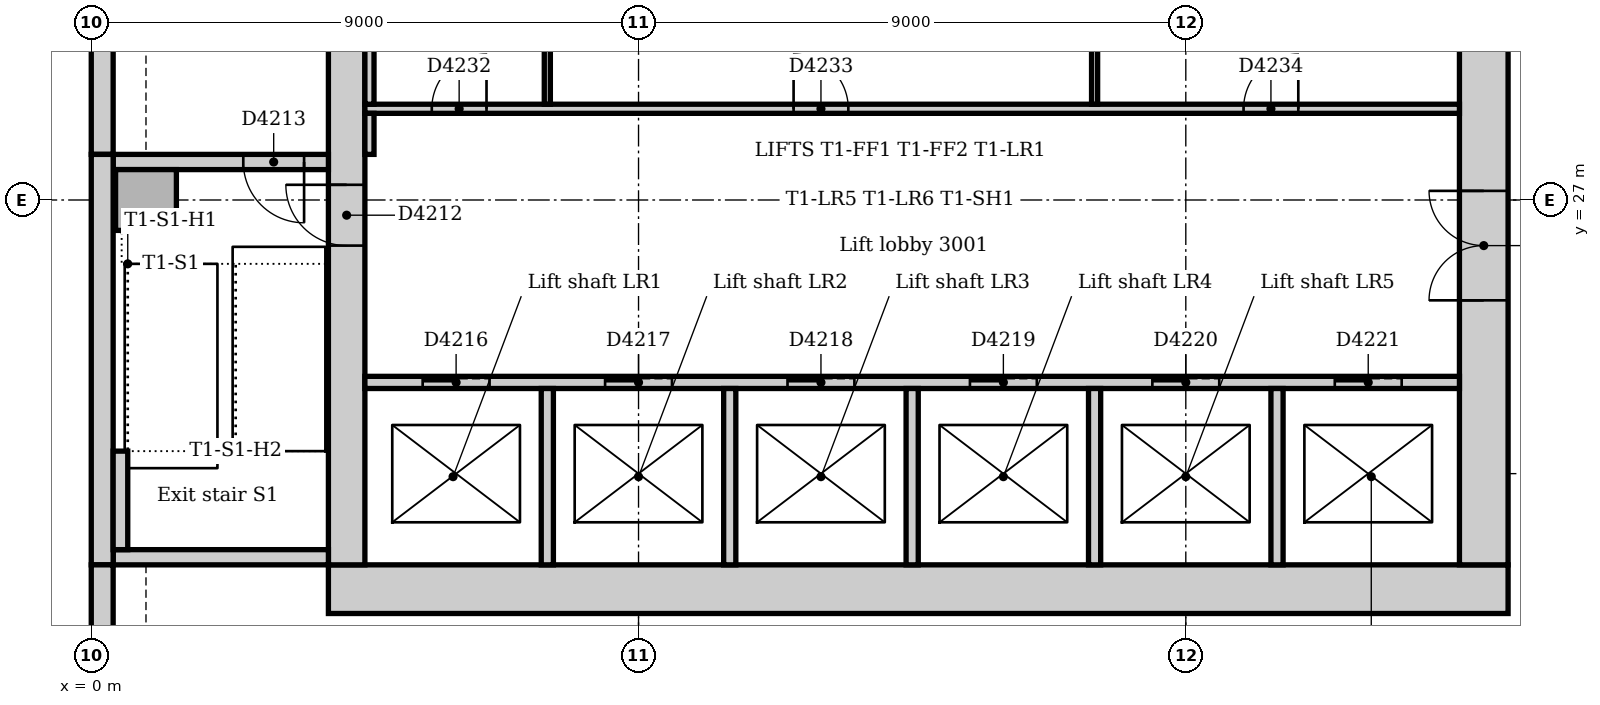
"""IFC4 building model, lengths in metres.
Left out: names, types, materials, properties, quantities, classifications, styles, units other than length and angle.
Written with IfcOpenShell. Run it as: python <this file> out.ifc"""

import sys

from ifc_helpers import new_model, si_unit, direction, frame, frame_2d, origin, origin_2d, place, context, subcontext, project, spatial, rectangle, extrude, element, fill, save


model = new_model("IFC4")
c1 = context("Model", 3, precision=1e-05, world=origin(), true_north=direction((0.0, 1.0)))
c2 = subcontext(c1, "Body", "Model", "MODEL_VIEW")
j1 = project(units=[si_unit("LENGTHUNIT", "METRE"), si_unit("PLANEANGLEUNIT", "RADIAN")], contexts=[c1])
p1 = place(None, origin())
s1 = spatial("IfcSite", under=j1, at=p1, CompositionType="ELEMENT")
p2 = place(p1, origin())
s2 = spatial("IfcBuilding", under=s1, at=p2, CompositionType="ELEMENT")
p3 = place(p2, frame((0.0, 0.0, 128.0)))
s3 = spatial("IfcBuildingStorey", under=s2, at=p3, CompositionType="ELEMENT", Elevation=128.0)
p4 = place(p3, frame((3.9, 20.6, 0.0), z_axis=(0.0, 0.0, 1.0), x_axis=(1.0, 0.0, 0.0)))
e1 = element("IfcWall", 1, at=p4, inside=s3, PredefinedType="SOLIDWALL", context=c2, shape_type="SweptSolid", body=[
    extrude(rectangle(XDim=19.4, YDim=0.8, at=frame_2d((9.7, 0.0))), origin(), (0.0, 0.0, 1.0), 4.0),
])
p5 = place(p3, frame((22.9, 21.0, 0.0), z_axis=(0.0, 0.0, 1.0), x_axis=(0.0, 1.0, 0.0)))
e2 = element("IfcWall", 2, at=p5, inside=s3, PredefinedType="SOLIDWALL", context=c2, shape_type="SweptSolid", body=[
    extrude(rectangle(XDim=10.5, YDim=0.8, at=frame_2d((5.25, 0.0))), origin(), (0.0, 0.0, 1.0), 4.0),
])
p6 = place(p5, frame((4.35, 0.0, 0.0)))
e3 = element("IfcOpeningElement", 3, at=p6, cuts=e2, PredefinedType="OPENING", context=c2, shape_type="SweptSolid", body=[
    extrude(rectangle(XDim=1.8, YDim=2.1, at=frame_2d((0.9, 1.05))), frame((0.0, 0.41, 0.0), z_axis=(0.0, -1.0, 0.0), x_axis=(1.0, 0.0, 0.0)), (0.0, 0.0, 1.0), 0.82),
])
p7 = place(p3, frame((4.2, 31.5, 0.0), z_axis=(0.0, 0.0, 1.0), x_axis=(0.0, -1.0, 0.0)))
e4 = element("IfcWall", 4, at=p7, inside=s3, PredefinedType="SOLIDWALL", context=c2, shape_type="SweptSolid", body=[
    extrude(rectangle(XDim=10.5, YDim=0.6, at=frame_2d((5.25, 0.0))), origin(), (0.0, 0.0, 1.0), 4.0),
])
p8 = place(p7, frame((4.25, 0.0, 0.0)))
e5 = element("IfcOpeningElement", 5, at=p8, cuts=e4, PredefinedType="OPENING", context=c2, shape_type="SweptSolid", body=[
    extrude(rectangle(XDim=1.0, YDim=2.1, at=frame_2d((0.5, 1.05))), frame((0.0, 0.31, 0.0), z_axis=(0.0, -1.0, 0.0), x_axis=(1.0, 0.0, 0.0)), (0.0, 0.0, 1.0), 0.62),
])
p9 = place(p3, frame((0.36, 21.125, 0.0), z_axis=(0.0, 0.0, 1.0), x_axis=(1.0, 0.0, 0.0)))
e6 = element("IfcWall", 6, at=p9, inside=s3, PredefinedType="SOLIDWALL", context=c2, shape_type="SweptSolid", body=[
    extrude(rectangle(XDim=3.54, YDim=0.25, at=frame_2d((1.77, 0.0))), origin(), (0.0, 0.0, 1.0), 4.0),
])
p10 = place(p3, frame((3.9, 27.625, 0.0), z_axis=(0.0, 0.0, 1.0), x_axis=(-1.0, 0.0, 0.0)))
e7 = element("IfcWall", 7, at=p10, inside=s3, PredefinedType="SOLIDWALL", context=c2, shape_type="SweptSolid", body=[
    extrude(rectangle(XDim=3.54, YDim=0.25, at=frame_2d((1.77, 0.0))), origin(), (0.0, 0.0, 1.0), 4.0),
])
p11 = place(p10, frame((0.4, 0.0, 0.0)))
e8 = element("IfcOpeningElement", 8, at=p11, cuts=e7, PredefinedType="OPENING", context=c2, shape_type="SweptSolid", body=[
    extrude(rectangle(XDim=1.0, YDim=2.1, at=frame_2d((0.5, 1.05))), frame((0.0, 0.135, 0.0), z_axis=(0.0, -1.0, 0.0), x_axis=(1.0, 0.0, 0.0)), (0.0, 0.0, 1.0), 0.27),
])
p12 = place(p3, frame((0.9, 27.0, 0.0), z_axis=(0.0, 0.0, 1.0), x_axis=(1.0, 0.0, 0.0)))
e9 = element("IfcColumn", 9, at=p12, inside=s3, PredefinedType="COLUMN", context=c2, shape_type="SweptSolid", body=[
    extrude(rectangle(XDim=1.0, YDim=1.0, at=origin_2d()), origin(), (0.0, 0.0, 1.0), 4.0),
])
p13 = place(p3, frame((0.18, 35.25, 0.0), z_axis=(0.0, 0.0, 1.0), x_axis=(0.0, -1.0, 0.0)))
e10 = element("IfcWall", 10, at=p13, inside=s3, PredefinedType="STANDARD", context=c2, shape_type="SweptSolid", body=[
    extrude(rectangle(XDim=7.5, YDim=0.36, at=frame_2d((3.75, 0.0))), origin(), (0.0, 0.0, 1.0), 3.85),
])
p14 = place(p3, frame((0.18, 27.75, 0.0), z_axis=(0.0, 0.0, 1.0), x_axis=(0.0, -1.0, 0.0)))
e11 = element("IfcWall", 11, at=p14, inside=s3, PredefinedType="STANDARD", context=c2, shape_type="SweptSolid", body=[
    extrude(rectangle(XDim=6.75, YDim=0.36, at=frame_2d((3.375, 0.0))), origin(), (0.0, 0.0, 1.0), 3.85),
])
p15 = place(p3, frame((0.18, 21.0, 0.0), z_axis=(0.0, 0.0, 1.0), x_axis=(0.0, -1.0, 0.0)))
e12 = element("IfcWall", 12, at=p15, inside=s3, PredefinedType="STANDARD", context=c2, shape_type="SweptSolid", body=[
    extrude(rectangle(XDim=12.257, YDim=0.36, at=frame_2d((6.129, 0.0))), origin(), (0.0, 0.0, 1.0), 3.85),
])
p16 = place(p15, frame((1.35, 0.0, 0.9)))
e13 = element("IfcOpeningElement", 13, at=p16, cuts=e12, PredefinedType="OPENING", context=c2, shape_type="SweptSolid", body=[
    extrude(rectangle(XDim=3.3, YDim=1.6, at=frame_2d((1.65, 0.8))), frame((0.0, 0.19, 0.0), z_axis=(0.0, -1.0, 0.0), x_axis=(1.0, 0.0, 0.0)), (0.0, 0.0, 1.0), 0.38),
])
p17 = place(p15, frame((5.85, 0.0, 0.9)))
e14 = element("IfcOpeningElement", 14, at=p17, cuts=e12, PredefinedType="OPENING", context=c2, shape_type="SweptSolid", body=[
    extrude(rectangle(XDim=3.3, YDim=1.6, at=frame_2d((1.65, 0.8))), frame((0.0, 0.19, 0.0), z_axis=(0.0, -1.0, 0.0), x_axis=(1.0, 0.0, 0.0)), (0.0, 0.0, 1.0), 0.38),
])
p18 = place(p3, frame((0.48, 21.25, 0.0), z_axis=(0.0, 0.0, 1.0), x_axis=(0.0, 1.0, 0.0)))
e15 = element("IfcWall", 15, at=p18, inside=s3, PredefinedType="STANDARD", context=c2, shape_type="SweptSolid", body=[
    extrude(rectangle(XDim=1.62, YDim=0.24, at=frame_2d((0.81, 0.0))), origin(), (0.0, 0.0, 1.0), 4.0),
])
p19 = place(p3, frame((4.5, 24.0, 0.0), z_axis=(0.0, 0.0, 1.0), x_axis=(1.0, 0.0, 0.0)))
e16 = element("IfcWall", 16, at=p19, inside=s3, PredefinedType="PARTITIONING", context=c2, shape_type="SweptSolid", body=[
    extrude(rectangle(XDim=18.0, YDim=0.2, at=frame_2d((9.0, 0.0))), origin(), (0.0, 0.0, 1.0), 3.85),
])
p20 = place(p19, frame((0.95, 0.0, 0.0)))
e17 = element("IfcOpeningElement", 17, at=p20, cuts=e16, PredefinedType="OPENING", context=c2, shape_type="SweptSolid", body=[
    extrude(rectangle(XDim=1.1, YDim=2.1, at=frame_2d((0.55, 1.05))), frame((0.0, 0.11, 0.0), z_axis=(0.0, -1.0, 0.0), x_axis=(1.0, 0.0, 0.0)), (0.0, 0.0, 1.0), 0.22),
])
p21 = place(p19, frame((3.95, 0.0, 0.0)))
e18 = element("IfcOpeningElement", 18, at=p21, cuts=e16, PredefinedType="OPENING", context=c2, shape_type="SweptSolid", body=[
    extrude(rectangle(XDim=1.1, YDim=2.1, at=frame_2d((0.55, 1.05))), frame((0.0, 0.11, 0.0), z_axis=(0.0, -1.0, 0.0), x_axis=(1.0, 0.0, 0.0)), (0.0, 0.0, 1.0), 0.22),
])
p22 = place(p19, frame((6.95, 0.0, 0.0)))
e19 = element("IfcOpeningElement", 19, at=p22, cuts=e16, PredefinedType="OPENING", context=c2, shape_type="SweptSolid", body=[
    extrude(rectangle(XDim=1.1, YDim=2.1, at=frame_2d((0.55, 1.05))), frame((0.0, 0.11, 0.0), z_axis=(0.0, -1.0, 0.0), x_axis=(1.0, 0.0, 0.0)), (0.0, 0.0, 1.0), 0.22),
])
p23 = place(p19, frame((9.95, 0.0, 0.0)))
e20 = element("IfcOpeningElement", 20, at=p23, cuts=e16, PredefinedType="OPENING", context=c2, shape_type="SweptSolid", body=[
    extrude(rectangle(XDim=1.1, YDim=2.1, at=frame_2d((0.55, 1.05))), frame((0.0, 0.11, 0.0), z_axis=(0.0, -1.0, 0.0), x_axis=(1.0, 0.0, 0.0)), (0.0, 0.0, 1.0), 0.22),
])
p24 = place(p19, frame((12.95, 0.0, 0.0)))
e21 = element("IfcOpeningElement", 21, at=p24, cuts=e16, PredefinedType="OPENING", context=c2, shape_type="SweptSolid", body=[
    extrude(rectangle(XDim=1.1, YDim=2.1, at=frame_2d((0.55, 1.05))), frame((0.0, 0.11, 0.0), z_axis=(0.0, -1.0, 0.0), x_axis=(1.0, 0.0, 0.0)), (0.0, 0.0, 1.0), 0.22),
])
p25 = place(p19, frame((15.95, 0.0, 0.0)))
e22 = element("IfcOpeningElement", 22, at=p25, cuts=e16, PredefinedType="OPENING", context=c2, shape_type="SweptSolid", body=[
    extrude(rectangle(XDim=1.1, YDim=2.1, at=frame_2d((0.55, 1.05))), frame((0.0, 0.11, 0.0), z_axis=(0.0, -1.0, 0.0), x_axis=(1.0, 0.0, 0.0)), (0.0, 0.0, 1.0), 0.22),
])
for number, where, z_axis, x_axis in (
    (23, (7.5, 21.0, 0.0), (0.0, 0.0, 1.0), (0.0, 1.0, 0.0)),
    (24, (10.5, 21.0, 0.0), (0.0, 0.0, 1.0), (0.0, 1.0, 0.0)),
    (25, (13.5, 21.0, 0.0), (0.0, 0.0, 1.0), (0.0, 1.0, 0.0)),
    (26, (16.5, 21.0, 0.0), (0.0, 0.0, 1.0), (0.0, 1.0, 0.0)),
    (27, (19.5, 21.0, 0.0), (0.0, 0.0, 1.0), (0.0, 1.0, 0.0)),
):
    element("IfcWall", number, at=place(p3, frame(where, z_axis=z_axis, x_axis=x_axis)), inside=s3, PredefinedType="PARTITIONING", context=c2, shape_type="SweptSolid", body=[
        extrude(rectangle(XDim=2.9, YDim=0.2, at=frame_2d((1.45, 0.0))), origin(), (0.0, 0.0, 1.0), 3.85),
    ])
p26 = place(p3, frame((4.5, 28.5, 0.0), z_axis=(0.0, 0.0, 1.0), x_axis=(1.0, 0.0, 0.0)))
e28 = element("IfcWall", 28, at=p26, inside=s3, PredefinedType="PARTITIONING", context=c2, shape_type="SweptSolid", body=[
    extrude(rectangle(XDim=18.0, YDim=0.15, at=frame_2d((9.0, 0.0))), origin(), (0.0, 0.0, 1.0), 3.85),
])
p27 = place(p26, frame((1.1, 0.0, 0.0)))
e29 = element("IfcOpeningElement", 29, at=p27, cuts=e28, PredefinedType="OPENING", context=c2, shape_type="SweptSolid", body=[
    extrude(rectangle(XDim=0.9, YDim=2.1, at=frame_2d((0.45, 1.05))), frame((0.0, 0.085, 0.0), z_axis=(0.0, -1.0, 0.0), x_axis=(1.0, 0.0, 0.0)), (0.0, 0.0, 1.0), 0.17),
])
p28 = place(p26, frame((7.05, 0.0, 0.0)))
e30 = element("IfcOpeningElement", 30, at=p28, cuts=e28, PredefinedType="OPENING", context=c2, shape_type="SweptSolid", body=[
    extrude(rectangle(XDim=0.9, YDim=2.1, at=frame_2d((0.45, 1.05))), frame((0.0, 0.085, 0.0), z_axis=(0.0, -1.0, 0.0), x_axis=(1.0, 0.0, 0.0)), (0.0, 0.0, 1.0), 0.17),
])
p29 = place(p26, frame((14.45, 0.0, 0.0)))
e31 = element("IfcOpeningElement", 31, at=p29, cuts=e28, PredefinedType="OPENING", context=c2, shape_type="SweptSolid", body=[
    extrude(rectangle(XDim=0.9, YDim=2.1, at=frame_2d((0.45, 1.05))), frame((0.0, 0.085, 0.0), z_axis=(0.0, -1.0, 0.0), x_axis=(1.0, 0.0, 0.0)), (0.0, 0.0, 1.0), 0.17),
])
p30 = place(p3, frame((4.575, 27.75, 0.0), z_axis=(0.0, 0.0, 1.0), x_axis=(0.0, 1.0, 0.0)))
e32 = element("IfcWall", 32, at=p30, inside=s3, PredefinedType="PARTITIONING", context=c2, shape_type="SweptSolid", body=[
    extrude(rectangle(XDim=0.675, YDim=0.15, at=frame_2d((0.338, 0.0))), origin(), (0.0, 0.0, 1.0), 3.85),
])
p31 = place(p3, frame((4.575, 28.575, 0.0), z_axis=(0.0, 0.0, 1.0), x_axis=(0.0, 1.0, 0.0)))
e33 = element("IfcWall", 33, at=p31, inside=s3, PredefinedType="PARTITIONING", context=c2, shape_type="SweptSolid", body=[
    extrude(rectangle(XDim=2.675, YDim=0.15, at=frame_2d((1.337, 0.0))), origin(), (0.0, 0.0, 1.0), 3.85),
])
for number, where, z_axis, x_axis in (
    (34, (7.5, 28.575, 0.0), (0.0, 0.0, 1.0), (0.0, 1.0, 0.0)),
    (35, (16.5, 28.575, 0.0), (0.0, 0.0, 1.0), (0.0, 1.0, 0.0)),
):
    element("IfcWall", number, at=place(p3, frame(where, z_axis=z_axis, x_axis=x_axis)), inside=s3, PredefinedType="PARTITIONING", context=c2, shape_type="SweptSolid", body=[
        extrude(rectangle(XDim=2.675, YDim=0.1, at=frame_2d((1.337, 0.0))), origin(), (0.0, 0.0, 1.0), 3.85),
    ])
p32 = place(p8, frame((1.0, 0.0, 0.0), z_axis=(0.0, 0.0, 1.0), x_axis=(-1.0, 0.0, 0.0)))
e36 = element("IfcDoor", 36, at=p32, inside=s3, OperationType="SINGLE_SWING_RIGHT", PredefinedType="DOOR", context=c2, shape_type="SweptSolid", body=[
    extrude(rectangle(XDim=1.0, YDim=2.1, at=frame_2d((0.5, 1.05))), frame((0.0, 0.025, 0.0), z_axis=(0.0, -1.0, 0.0), x_axis=(1.0, 0.0, 0.0)), (0.0, 0.0, 1.0), 0.05),
])
fill(e5, e36)
p33 = place(p11, origin())
e37 = element("IfcDoor", 37, at=p33, inside=s3, OperationType="SINGLE_SWING_LEFT", PredefinedType="DOOR", context=c2, shape_type="SweptSolid", body=[
    extrude(rectangle(XDim=1.0, YDim=2.1, at=frame_2d((0.5, 1.05))), frame((0.0, 0.025, 0.0), z_axis=(0.0, -1.0, 0.0), x_axis=(1.0, 0.0, 0.0)), (0.0, 0.0, 1.0), 0.05),
])
fill(e8, e37)
p34 = place(p20, origin())
e38 = element("IfcDoor", 38, at=p34, inside=s3, OperationType="SLIDING_TO_LEFT", PredefinedType="DOOR", context=c2, shape_type="SweptSolid", body=[
    extrude(rectangle(XDim=1.1, YDim=2.1, at=frame_2d((0.55, 1.05))), frame((0.0, 0.025, 0.0), z_axis=(0.0, -1.0, 0.0), x_axis=(1.0, 0.0, 0.0)), (0.0, 0.0, 1.0), 0.05),
])
fill(e17, e38)
p35 = place(p21, origin())
e39 = element("IfcDoor", 39, at=p35, inside=s3, OperationType="SLIDING_TO_LEFT", PredefinedType="DOOR", context=c2, shape_type="SweptSolid", body=[
    extrude(rectangle(XDim=1.1, YDim=2.1, at=frame_2d((0.55, 1.05))), frame((0.0, 0.025, 0.0), z_axis=(0.0, -1.0, 0.0), x_axis=(1.0, 0.0, 0.0)), (0.0, 0.0, 1.0), 0.05),
])
fill(e18, e39)
p36 = place(p22, origin())
e40 = element("IfcDoor", 40, at=p36, inside=s3, OperationType="SLIDING_TO_LEFT", PredefinedType="DOOR", context=c2, shape_type="SweptSolid", body=[
    extrude(rectangle(XDim=1.1, YDim=2.1, at=frame_2d((0.55, 1.05))), frame((0.0, 0.025, 0.0), z_axis=(0.0, -1.0, 0.0), x_axis=(1.0, 0.0, 0.0)), (0.0, 0.0, 1.0), 0.05),
])
fill(e19, e40)
p37 = place(p23, origin())
e41 = element("IfcDoor", 41, at=p37, inside=s3, OperationType="SLIDING_TO_LEFT", PredefinedType="DOOR", context=c2, shape_type="SweptSolid", body=[
    extrude(rectangle(XDim=1.1, YDim=2.1, at=frame_2d((0.55, 1.05))), frame((0.0, 0.025, 0.0), z_axis=(0.0, -1.0, 0.0), x_axis=(1.0, 0.0, 0.0)), (0.0, 0.0, 1.0), 0.05),
])
fill(e20, e41)
p38 = place(p24, origin())
e42 = element("IfcDoor", 42, at=p38, inside=s3, OperationType="SLIDING_TO_LEFT", PredefinedType="DOOR", context=c2, shape_type="SweptSolid", body=[
    extrude(rectangle(XDim=1.1, YDim=2.1, at=frame_2d((0.55, 1.05))), frame((0.0, 0.025, 0.0), z_axis=(0.0, -1.0, 0.0), x_axis=(1.0, 0.0, 0.0)), (0.0, 0.0, 1.0), 0.05),
])
fill(e21, e42)
p39 = place(p25, origin())
e43 = element("IfcDoor", 43, at=p39, inside=s3, OperationType="SLIDING_TO_LEFT", PredefinedType="DOOR", context=c2, shape_type="SweptSolid", body=[
    extrude(rectangle(XDim=1.1, YDim=2.1, at=frame_2d((0.55, 1.05))), frame((0.0, 0.025, 0.0), z_axis=(0.0, -1.0, 0.0), x_axis=(1.0, 0.0, 0.0)), (0.0, 0.0, 1.0), 0.05),
])
fill(e22, e43)
p40 = place(p6, origin())
e44 = element("IfcDoor", 44, at=p40, inside=s3, OperationType="DOUBLE_DOOR_DOUBLE_SWING", PredefinedType="DOOR", context=c2, shape_type="SweptSolid", body=[
    extrude(rectangle(XDim=1.8, YDim=2.1, at=frame_2d((0.9, 1.05))), frame((0.0, 0.025, 0.0), z_axis=(0.0, -1.0, 0.0), x_axis=(1.0, 0.0, 0.0)), (0.0, 0.0, 1.0), 0.05),
])
fill(e3, e44)
p41 = place(p27, origin())
e45 = element("IfcDoor", 45, at=p41, inside=s3, OperationType="SINGLE_SWING_RIGHT", PredefinedType="DOOR", context=c2, shape_type="SweptSolid", body=[
    extrude(rectangle(XDim=0.9, YDim=2.1, at=frame_2d((0.45, 1.05))), frame((0.0, 0.025, 0.0), z_axis=(0.0, -1.0, 0.0), x_axis=(1.0, 0.0, 0.0)), (0.0, 0.0, 1.0), 0.05),
])
fill(e29, e45)
p42 = place(p28, origin())
e46 = element("IfcDoor", 46, at=p42, inside=s3, OperationType="SINGLE_SWING_LEFT", PredefinedType="DOOR", context=c2, shape_type="SweptSolid", body=[
    extrude(rectangle(XDim=0.9, YDim=2.1, at=frame_2d((0.45, 1.05))), frame((0.0, 0.025, 0.0), z_axis=(0.0, -1.0, 0.0), x_axis=(1.0, 0.0, 0.0)), (0.0, 0.0, 1.0), 0.05),
])
fill(e30, e46)
p43 = place(p29, origin())
e47 = element("IfcDoor", 47, at=p43, inside=s3, OperationType="SINGLE_SWING_RIGHT", PredefinedType="DOOR", context=c2, shape_type="SweptSolid", body=[
    extrude(rectangle(XDim=0.9, YDim=2.1, at=frame_2d((0.45, 1.05))), frame((0.0, 0.025, 0.0), z_axis=(0.0, -1.0, 0.0), x_axis=(1.0, 0.0, 0.0)), (0.0, 0.0, 1.0), 0.05),
])
fill(e31, e47)
save(model, sys.argv[1])
